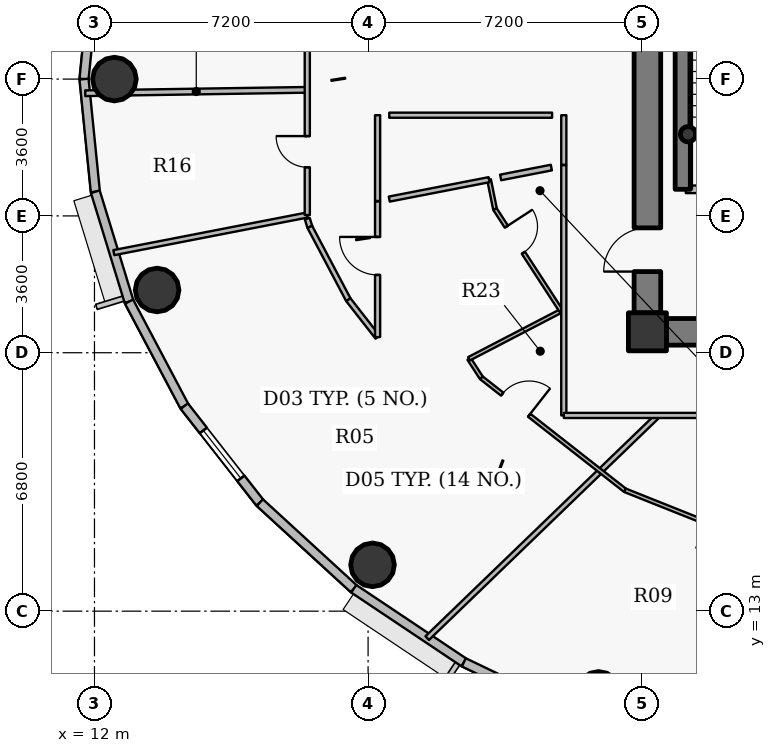
"""IFC4 building model, lengths in metres.
Left out: names, types, materials, properties, quantities, classifications, styles, units other than length and angle.
Written with IfcOpenShell. Run it as: python <this file> out.ifc"""

import sys

from ifc_helpers import new_model, si_unit, direction, frame, frame_2d, origin, origin_2d, place, context, subcontext, project, spatial, rectangle, hollow_circle, extrude, source, transform, mapped, element, fill, save


model = new_model("IFC4")
c1 = context("Model", 3, precision=1e-05, world=origin(), true_north=direction((0.0, 1.0)))
c2 = subcontext(c1, "Body", "Model", "MODEL_VIEW")
j1 = project(units=[si_unit("LENGTHUNIT", "METRE"), si_unit("PLANEANGLEUNIT", "RADIAN")], contexts=[c1])
p1 = place(None, origin())
s1 = spatial("IfcSite", under=j1, at=p1, CompositionType="ELEMENT")
p2 = place(p1, origin())
s2 = spatial("IfcBuilding", under=s1, at=p2, CompositionType="ELEMENT")
p3 = place(p2, frame((0.0, 0.0, 251.55)))
s3 = spatial("IfcBuildingStorey", under=s2, at=p3, CompositionType="ELEMENT", Elevation=251.55)
p4 = place(p3, frame((26.55, 20.35, 0.0), z_axis=(0.0, 0.0, 1.0), x_axis=(1.0, 0.0, 0.0)))
e1 = element("IfcColumn", 1, at=p4, inside=s3, PredefinedType="COLUMN", context=c2, shape_type="SweptSolid", body=[
    extrude(rectangle(XDim=1.0, YDim=1.0, at=origin_2d()), origin(), (0.0, 0.0, 1.0), 3.75),
])
p5 = place(p3, frame((27.48, 24.1, 0.0), z_axis=(0.0, 0.0, 1.0), x_axis=(0.0, 1.0, 0.0)))
e2 = element("IfcWall", 2, at=p5, inside=s3, PredefinedType="SHEAR", context=c2, shape_type="SweptSolid", body=[
    extrude(rectangle(XDim=8.6, YDim=0.4, at=frame_2d((4.3, 0.0))), origin(), (0.0, 0.0, 1.0), 3.75),
])
p6 = place(p3, frame((27.62, 25.55, 0.0), z_axis=(0.0, 0.0, 1.0), x_axis=(1.0, 0.0, 0.0)))
e3 = element("IfcColumn", 3, at=p6, inside=s3, PredefinedType="COLUMN", context=c2, shape_type="SweptSolid", body=[
    extrude(hollow_circle(Radius=0.203, WallThickness=0.016, at=origin_2d()), origin(), (0.0, 0.0, 1.0), 3.75),
])
p7 = place(p3, frame((44.95, 20.35, 0.0), z_axis=(0.0, 0.0, 1.0), x_axis=(-1.0, 0.0, 0.0)))
e4 = element("IfcWall", 4, at=p7, inside=s3, PredefinedType="SHEAR", context=c2, shape_type="SweptSolid", body=[
    extrude(rectangle(XDim=17.9, YDim=0.7, at=frame_2d((8.95, 0.0))), origin(), (0.0, 0.0, 1.0), 3.05),
])
p8 = place(p7, frame((9.7, 0.0, 0.0)))
e5 = element("IfcOpeningElement", 5, at=p8, cuts=e4, PredefinedType="OPENING", context=c2, shape_type="SweptSolid", body=[
    extrude(rectangle(XDim=1.15, YDim=2.15, at=origin_2d()), frame((0.575, 0.36, 1.075), z_axis=(0.0, -1.0, 0.0), x_axis=(1.0, 0.0, 0.0)), (0.0, 0.0, 1.0), 0.72),
])
p9 = place(p3, frame((26.55, 20.85, 0.0), z_axis=(0.0, 0.0, 1.0), x_axis=(0.0, 1.0, 0.0)))
e6 = element("IfcWall", 6, at=p9, inside=s3, PredefinedType="SHEAR", context=c2, shape_type="SweptSolid", body=[
    extrude(rectangle(XDim=12.3, YDim=0.7, at=frame_2d((6.15, 0.0))), origin(), (0.0, 0.0, 1.0), 3.05),
])
p10 = place(p9, frame((1.085, 0.0, 0.0)))
e7 = element("IfcOpeningElement", 7, at=p10, cuts=e6, PredefinedType="OPENING", context=c2, shape_type="SweptSolid", body=[
    extrude(rectangle(XDim=1.15, YDim=2.15, at=origin_2d()), frame((0.575, 0.36, 1.075), z_axis=(0.0, -1.0, 0.0), x_axis=(1.0, 0.0, 0.0)), (0.0, 0.0, 1.0), 0.72),
])
for number, where, z_axis, x_axis in (
    (8, (12.525, 27.0, 0.0), (0.0, 0.0, 1.0), (1.0, 0.0, 0.0)),
    (9, (13.649, 21.451, 0.0), (0.0, 0.0, 1.0), (1.0, 0.0, 0.0)),
    (10, (19.317, 14.219, 0.0), (0.0, 0.0, 1.0), (1.0, 0.0, 0.0)),
    (11, (25.265, 10.836, 0.0), (0.0, 0.0, 1.0), (1.0, 0.0, 0.0)),
):
    element("IfcColumn", number, at=place(p3, frame(where, z_axis=z_axis, x_axis=x_axis)), inside=s3, PredefinedType="COLUMN", context=c2, shape_type="SweptSolid", body=[
        extrude(hollow_circle(Radius=0.575, WallThickness=0.036, at=origin_2d()), origin(), (0.0, 0.0, 1.0), 3.75),
    ])
for number, where, z_axis, x_axis in (
    (12, (11.725, 27.0, 0.0), (0.0, 0.0, 1.0), (0.1, 0.995, 0.0)),
    (13, (12.023, 24.036, 0.0), (0.0, 0.0, 1.0), (-0.1, 0.995, 0.0)),
):
    element("IfcWall", number, at=place(p3, frame(where, z_axis=z_axis, x_axis=x_axis)), inside=s3, PredefinedType="SOLIDWALL", context=c2, shape_type="SweptSolid", body=[
        extrude(rectangle(XDim=2.979, YDim=0.24, at=frame_2d((1.489, 0.0))), origin(), (0.0, 0.0, 1.0), 3.5),
    ])
p11 = place(p3, frame((12.91, 21.144, 0.0), z_axis=(0.0, 0.0, 1.0), x_axis=(-0.293132907334, 0.95607170162, 0.0)))
e14 = element("IfcWall", 14, at=p11, inside=s3, PredefinedType="SOLIDWALL", context=c2, shape_type="SweptSolid", body=[
    extrude(rectangle(XDim=3.025, YDim=0.24, at=frame_2d((1.512, 0.0))), origin(), (0.0, 0.0, 1.0), 3.5),
])
p12 = place(p3, frame((14.364, 18.395, 0.0), z_axis=(0.0, 0.0, 1.0), x_axis=(-0.46766049993, 0.883908172157, 0.0)))
e15 = element("IfcWall", 15, at=p12, inside=s3, PredefinedType="SOLIDWALL", context=c2, shape_type="SweptSolid", body=[
    extrude(rectangle(XDim=3.11, YDim=0.24, at=frame_2d((1.555, 0.0))), origin(), (0.0, 0.0, 1.0), 3.5),
])
p13 = place(p3, frame((16.352, 15.855, 0.0), z_axis=(0.0, 0.0, 1.0), x_axis=(-0.616312344705, 0.787501805562, 0.0)))
e16 = element("IfcWall", 16, at=p13, inside=s3, PredefinedType="SOLIDWALL", context=c2, shape_type="SweptSolid", body=[
    extrude(rectangle(XDim=3.225, YDim=0.24, at=frame_2d((1.612, 0.0))), origin(), (0.0, 0.0, 1.0), 3.5),
])
p14 = place(p13, frame((0.812, 0.0, 0.9)))
e17 = element("IfcOpeningElement", 17, at=p14, cuts=e16, PredefinedType="OPENING", context=c2, shape_type="SweptSolid", body=[
    extrude(rectangle(XDim=1.6, YDim=1.75, at=origin_2d()), frame((0.8, 0.13, 0.875), z_axis=(0.0, -1.0, 0.0), x_axis=(1.0, 0.0, 0.0)), (0.0, 0.0, 1.0), 0.26),
])
p15 = place(p3, frame((18.824, 13.589, 0.0), z_axis=(0.0, 0.0, 1.0), x_axis=(-0.737123922599, 0.675757591694, 0.0)))
e18 = element("IfcWall", 18, at=p15, inside=s3, PredefinedType="SOLIDWALL", context=c2, shape_type="SweptSolid", body=[
    extrude(rectangle(XDim=3.354, YDim=0.24, at=frame_2d((1.677, 0.0))), origin(), (0.0, 0.0, 1.0), 3.5),
])
p16 = place(p3, frame((21.72, 11.652, 0.0), z_axis=(0.0, 0.0, 1.0), x_axis=(-0.831262496074, 0.555880079352, 0.0)))
e19 = element("IfcWall", 19, at=p16, inside=s3, PredefinedType="SOLIDWALL", context=c2, shape_type="SweptSolid", body=[
    extrude(rectangle(XDim=3.484, YDim=0.24, at=frame_2d((1.742, 0.0))), origin(), (0.0, 0.0, 1.0), 3.5),
])
p17 = place(p3, frame((24.969, 10.094, 0.0), z_axis=(0.0, 0.0, 1.0), x_axis=(-0.901598104751, 0.432574684313, 0.0)))
e20 = element("IfcWall", 20, at=p17, inside=s3, PredefinedType="SOLIDWALL", context=c2, shape_type="SweptSolid", body=[
    extrude(rectangle(XDim=3.604, YDim=0.24, at=frame_2d((1.802, 0.0))), origin(), (0.0, 0.0, 1.0), 3.5),
])
p18 = place(p3, frame((11.757, 26.628, 0.0), z_axis=(0.0, 0.0, 1.0), x_axis=(0.999882437841, 0.015333313333, 0.0)))
e21 = element("IfcWall", 21, at=p18, inside=s3, PredefinedType="PARTITIONING", context=c2, shape_type="SweptSolid", body=[
    extrude(rectangle(XDim=5.844, YDim=0.15, at=frame_2d((2.922, 0.0))), origin(), (0.0, 0.0, 1.0), 2.985),
])
p19 = place(p3, frame((12.509, 22.434, 0.0), z_axis=(0.0, 0.0, 1.0), x_axis=(0.981630821079, 0.190790280431, 0.0)))
e22 = element("IfcWall", 22, at=p19, inside=s3, PredefinedType="PARTITIONING", context=c2, shape_type="SweptSolid", body=[
    extrude(rectangle(XDim=5.186, YDim=0.135, at=frame_2d((2.593, 0.0))), origin(), (0.0, 0.0, 1.0), 2.985),
])
p20 = place(p3, frame((17.6, 23.328, 0.0), z_axis=(0.0, 0.0, 1.0), x_axis=(0.292875000845, -0.956150738053, 0.0)))
e23 = element("IfcWall", 23, at=p20, inside=s3, PredefinedType="PARTITIONING", context=c2, shape_type="SweptSolid", body=[
    extrude(rectangle(XDim=0.227, YDim=0.135, at=frame_2d((0.113, 0.0))), origin(), (0.0, 0.0, 1.0), 3.5),
])
p21 = place(p3, frame((17.6, 23.423, 0.0), z_axis=(0.0, 0.0, 1.0), x_axis=(0.0, 1.0, 0.0)))
e24 = element("IfcWall", 24, at=p21, inside=s3, PredefinedType="PARTITIONING", context=c2, shape_type="SweptSolid", body=[
    extrude(rectangle(XDim=4.527, YDim=0.135, at=frame_2d((2.263, 0.0))), origin(), (0.0, 0.0, 1.0), 2.935),
])
p22 = place(p21, frame((1.257, 0.0, 0.0)))
e25 = element("IfcOpeningElement", 25, at=p22, cuts=e24, PredefinedType="OPENING", context=c2, shape_type="SweptSolid", body=[
    extrude(rectangle(XDim=0.82, YDim=2.1, at=origin_2d()), frame((0.41, 0.078, 1.05), z_axis=(0.0, -1.0, 0.0), x_axis=(1.0, 0.0, 0.0)), (0.0, 0.0, 1.0), 0.155),
])
p23 = place(p3, frame((17.667, 23.111, 0.0), z_axis=(0.0, 0.0, 1.0), x_axis=(0.467675622269, -0.883900171024, 0.0)))
e26 = element("IfcWall", 26, at=p23, inside=s3, PredefinedType="PARTITIONING", context=c2, shape_type="SweptSolid", body=[
    extrude(rectangle(XDim=2.168, YDim=0.135, at=frame_2d((1.084, 0.0))), origin(), (0.0, 0.0, 1.0), 2.935),
])
p24 = place(p3, frame((18.681, 21.194, 0.0), z_axis=(0.0, 0.0, 1.0), x_axis=(0.616239706802, -0.787558647823, 0.0)))
e27 = element("IfcWall", 27, at=p24, inside=s3, PredefinedType="PARTITIONING", context=c2, shape_type="SweptSolid", body=[
    extrude(rectangle(XDim=1.248, YDim=0.135, at=frame_2d((0.624, 0.0))), origin(), (0.0, 0.0, 1.0), 3.5),
])
p25 = place(p3, frame((19.45, 20.211, 0.0), z_axis=(0.0, 0.0, 1.0), x_axis=(0.0, 1.0, 0.0)))
e28 = element("IfcWall", 28, at=p25, inside=s3, PredefinedType="PARTITIONING", context=c2, shape_type="SweptSolid", body=[
    extrude(rectangle(XDim=3.572, YDim=0.135, at=frame_2d((1.786, 0.0))), origin(), (0.0, 0.0, 1.0), 2.935),
])
p26 = place(p25, frame((1.636, 0.0, 0.0)))
e29 = element("IfcOpeningElement", 29, at=p26, cuts=e28, PredefinedType="OPENING", context=c2, shape_type="SweptSolid", body=[
    extrude(rectangle(XDim=1.0, YDim=2.15, at=origin_2d()), frame((0.5, 0.078, 1.075), z_axis=(0.0, -1.0, 0.0), x_axis=(1.0, 0.0, 0.0)), (0.0, 0.0, 1.0), 0.155),
])
p27 = place(p3, frame((20.756, 12.291, 0.0), z_axis=(0.0, 0.0, 1.0), x_axis=(0.719623273788, 0.694364705196, 0.0)))
e30 = element("IfcWall", 30, at=p27, inside=s3, PredefinedType="PARTITIONING", context=c2, shape_type="SweptSolid", body=[
    extrude(rectangle(XDim=8.438, YDim=0.135, at=frame_2d((4.219, 0.0))), origin(), (0.0, 0.0, 1.0), 2.985),
])
p28 = place(p3, frame((21.856, 19.641, 0.0), z_axis=(0.0, 0.0, 1.0), x_axis=(0.545246536912, -0.838275738636, 0.0)))
e31 = element("IfcWall", 31, at=p28, inside=s3, PredefinedType="PARTITIONING", context=c2, shape_type="SweptSolid", body=[
    extrude(rectangle(XDim=0.598, YDim=0.1, at=frame_2d((0.299, 0.0))), origin(), (0.0, 0.0, 1.0), 3.5),
])
p29 = place(p3, frame((21.856, 19.641, 0.0), z_axis=(0.0, 0.0, 1.0), x_axis=(0.887130502634, 0.461518657582, 0.0)))
e32 = element("IfcWall", 32, at=p29, inside=s3, PredefinedType="PARTITIONING", context=c2, shape_type="SweptSolid", body=[
    extrude(rectangle(XDim=2.733, YDim=0.1, at=frame_2d((1.367, 0.0))), origin(), (0.0, 0.0, 1.0), 3.5),
])
p30 = place(p3, frame((22.182, 19.139, 0.0), z_axis=(0.0, 0.0, 1.0), x_axis=(0.787386902975, -0.616459134917, 0.0)))
e33 = element("IfcWall", 33, at=p30, inside=s3, PredefinedType="PARTITIONING", context=c2, shape_type="SweptSolid", body=[
    extrude(rectangle(XDim=4.799, YDim=0.1, at=frame_2d((2.399, 0.0))), origin(), (0.0, 0.0, 1.0), 2.935),
])
p31 = place(p30, frame((0.695, 0.0, 0.0)))
e34 = element("IfcOpeningElement", 34, at=p31, cuts=e33, PredefinedType="OPENING", context=c2, shape_type="SweptSolid", body=[
    extrude(rectangle(XDim=0.9, YDim=2.1, at=origin_2d()), frame((0.45, 0.06, 1.05), z_axis=(0.0, -1.0, 0.0), x_axis=(1.0, 0.0, 0.0)), (0.0, 0.0, 1.0), 0.12),
])
p32 = place(p3, frame((22.383, 24.353, 0.0), z_axis=(0.0, 0.0, 1.0), x_axis=(0.198542560358, -0.980092266946, 0.0)))
e35 = element("IfcWall", 35, at=p32, inside=s3, PredefinedType="PARTITIONING", context=c2, shape_type="SweptSolid", body=[
    extrude(rectangle(XDim=0.793, YDim=0.1, at=frame_2d((0.396, 0.0))), origin(), (0.0, 0.0, 1.0), 2.935),
])
p33 = place(p3, frame((22.541, 23.576, 0.0), z_axis=(0.0, 0.0, 1.0), x_axis=(0.545375666154, -0.838191733893, 0.0)))
e36 = element("IfcWall", 36, at=p33, inside=s3, PredefinedType="PARTITIONING", context=c2, shape_type="SweptSolid", body=[
    extrude(rectangle(XDim=3.19, YDim=0.1, at=frame_2d((1.595, 0.0))), origin(), (0.0, 0.0, 1.0), 2.935),
])
p34 = place(p33, frame((0.546, 0.0, 0.0)))
e37 = element("IfcOpeningElement", 37, at=p34, cuts=e36, PredefinedType="OPENING", context=c2, shape_type="SweptSolid", body=[
    extrude(rectangle(XDim=0.82, YDim=2.1, at=origin_2d()), frame((0.41, 0.06, 1.05), z_axis=(0.0, -1.0, 0.0), x_axis=(1.0, 0.0, 0.0)), (0.0, 0.0, 1.0), 0.12),
])
p35 = place(p3, frame((24.35, 18.15, 0.0), z_axis=(0.0, 0.0, 1.0), x_axis=(0.0, 1.0, 0.0)))
e38 = element("IfcWall", 38, at=p35, inside=s3, PredefinedType="PARTITIONING", context=c2, shape_type="SweptSolid", body=[
    extrude(rectangle(XDim=6.585, YDim=0.135, at=frame_2d((3.293, 0.0))), origin(), (0.0, 0.0, 1.0), 2.935),
])
p36 = place(p3, frame((24.35, 18.15, 0.0), z_axis=(0.0, 0.0, 1.0), x_axis=(1.0, 0.0, 0.0)))
e39 = element("IfcWall", 39, at=p36, inside=s3, PredefinedType="PARTITIONING", context=c2, shape_type="SweptSolid", body=[
    extrude(rectangle(XDim=23.85, YDim=0.135, at=frame_2d((11.925, 0.0))), origin(), (0.0, 0.0, 1.0), 2.935),
])
p37 = place(p36, frame((6.069, 0.0, 0.0)))
e40 = element("IfcOpeningElement", 40, at=p37, cuts=e39, PredefinedType="OPENING", context=c2, shape_type="SweptSolid", body=[
    extrude(rectangle(XDim=1.0, YDim=2.15, at=origin_2d()), frame((0.5, 0.078, 1.075), z_axis=(0.0, -1.0, 0.0), x_axis=(1.0, 0.0, 0.0)), (0.0, 0.0, 1.0), 0.155),
])
p38 = place(p36, frame((19.505, 0.0, 0.0)))
e41 = element("IfcOpeningElement", 41, at=p38, cuts=e39, PredefinedType="OPENING", context=c2, shape_type="SweptSolid", body=[
    extrude(rectangle(XDim=1.0, YDim=2.15, at=origin_2d()), frame((0.5, 0.078, 1.075), z_axis=(0.0, -1.0, 0.0), x_axis=(1.0, 0.0, 0.0)), (0.0, 0.0, 1.0), 0.155),
])
p39 = place(p3, frame((25.961, 16.181, 0.0), z_axis=(0.0, 0.0, 1.0), x_axis=(0.928801505367, -0.370577608105, 0.0)))
e42 = element("IfcWall", 42, at=p39, inside=s3, PredefinedType="PARTITIONING", context=c2, shape_type="SweptSolid", body=[
    extrude(rectangle(XDim=5.126, YDim=0.1, at=frame_2d((2.563, 0.0))), origin(), (0.0, 0.0, 1.0), 2.935),
])
p40 = place(p3, frame((27.56, 24.1, 0.0), z_axis=(0.0, 0.0, 1.0), x_axis=(1.0, 0.0, 0.0)))
e43 = element("IfcWall", 43, at=p40, inside=s3, PredefinedType="PARTITIONING", context=c2, shape_type="SweptSolid", body=[
    extrude(rectangle(XDim=3.54, YDim=0.2, at=frame_2d((1.77, 0.0))), origin(), (0.0, 0.0, 1.0), 3.5),
])
p41 = place(p40, frame((1.17, 0.0, 0.0)))
e44 = element("IfcOpeningElement", 44, at=p41, cuts=e43, PredefinedType="OPENING", context=c2, shape_type="SweptSolid", body=[
    extrude(rectangle(XDim=1.2, YDim=2.15, at=origin_2d()), frame((0.6, 0.11, 1.075), z_axis=(0.0, -1.0, 0.0), x_axis=(1.0, 0.0, 0.0)), (0.0, 0.0, 1.0), 0.22),
])
p42 = place(p3, frame((19.45, 26.05, 0.0), z_axis=(0.0, 0.0, 1.0), x_axis=(0.0, -1.0, 0.0)))
e45 = element("IfcWall", 45, at=p42, inside=s3, PredefinedType="PARTITIONING", context=c2, shape_type="SweptSolid", body=[
    extrude(rectangle(XDim=2.257, YDim=0.135, at=frame_2d((1.128, 0.0))), origin(), (0.0, 0.0, 1.0), 3.5),
])
p43 = place(p3, frame((26.2, 20.84, 0.0), z_axis=(0.0, 0.0, 1.0), x_axis=(0.0, -1.0, 0.0)))
e46 = element("IfcWall", 46, at=p43, inside=s3, PredefinedType="PARTITIONING", context=c2, shape_type="SweptSolid", body=[
    extrude(rectangle(XDim=0.84, YDim=0.135, at=frame_2d((0.42, 0.0))), origin(), (0.0, 0.0, 1.0), 3.185),
])
p44 = place(p3, frame((26.508, 20.0, 0.0), z_axis=(0.0, 0.0, 1.0), x_axis=(1.0, 0.0, 0.0)))
e47 = element("IfcWall", 47, at=p44, inside=s3, PredefinedType="PARTITIONING", context=c2, shape_type="SweptSolid", body=[
    extrude(rectangle(XDim=0.532, YDim=0.135, at=frame_2d((0.266, 0.0))), origin(), (0.0, 0.0, 1.0), 2.935),
])
p45 = place(p3, frame((24.35, 24.745, 0.0), z_axis=(0.0, 0.0, 1.0), x_axis=(0.0, 1.0, 0.0)))
e48 = element("IfcWall", 48, at=p45, inside=s3, PredefinedType="PARTITIONING", context=c2, shape_type="SweptSolid", body=[
    extrude(rectangle(XDim=1.305, YDim=0.135, at=frame_2d((0.652, 0.0))), origin(), (0.0, 0.0, 1.0), 3.5),
])
p46 = place(p3, frame((24.042, 26.05, 0.0), z_axis=(0.0, 0.0, 1.0), x_axis=(-1.0, 0.0, 0.0)))
e49 = element("IfcWall", 49, at=p46, inside=s3, PredefinedType="PARTITIONING", context=c2, shape_type="SweptSolid", body=[
    extrude(rectangle(XDim=4.285, YDim=0.135, at=frame_2d((2.143, 0.0))), origin(), (0.0, 0.0, 1.0), 3.5),
])
p47 = place(p3, frame((22.688, 24.412, 0.0), z_axis=(0.0, 0.0, 1.0), x_axis=(0.981616324133, 0.19086485322, 0.0)))
e50 = element("IfcWall", 50, at=p47, inside=s3, PredefinedType="PARTITIONING", context=c2, shape_type="SweptSolid", body=[
    extrude(rectangle(XDim=1.36, YDim=0.15, at=frame_2d((0.68, 0.0))), origin(), (0.0, 0.0, 1.0), 3.5),
])
p48 = place(p3, frame((19.758, 23.843, 0.0), z_axis=(0.0, 0.0, 1.0), x_axis=(0.98161966457, 0.190847672582, 0.0)))
e51 = element("IfcWall", 51, at=p48, inside=s3, PredefinedType="PARTITIONING", context=c2, shape_type="SweptSolid", body=[
    extrude(rectangle(XDim=2.675, YDim=0.135, at=frame_2d((1.337, 0.0))), origin(), (0.0, 0.0, 1.0), 3.5),
])
m1 = source(origin(), c2, "Body", "SweptSolid", [
    extrude(rectangle(XDim=1.6, YDim=1.75, at=origin_2d()), frame((0.8, 0.03, 0.875), z_axis=(0.0, -1.0, 0.0), x_axis=(1.0, 0.0, 0.0)), (0.0, 0.0, 1.0), 0.06),
])
p49 = place(p14, origin())
e52 = element("IfcWindow", 52, at=p49, inside=s3, PartitioningType="DOUBLE_PANEL_VERTICAL", PredefinedType="WINDOW", context=c2, shape_type="MappedRepresentation", body=[
    mapped(m1, transform((0.0, 0.0, 0.0), x_axis=(1.0, 0.0, 0.0), y_axis=(0.0, 1.0, 0.0), z_axis=(0.0, 0.0, 1.0), scale=1.0)),
])
fill(e17, e52)
m2 = source(origin(), c2, "Body", "SweptSolid", [
    extrude(rectangle(XDim=1.15, YDim=2.15, at=origin_2d()), frame((0.575, 0.025, 1.075), z_axis=(0.0, -1.0, 0.0), x_axis=(1.0, 0.0, 0.0)), (0.0, 0.0, 1.0), 0.05),
])
p50 = place(p10, origin())
e53 = element("IfcDoor", 53, at=p50, inside=s3, OperationType="SINGLE_SWING_LEFT", PredefinedType="DOOR", context=c2, shape_type="MappedRepresentation", body=[
    mapped(m2, transform((0.0, 0.0, 0.0), x_axis=(1.0, 0.0, 0.0), y_axis=(0.0, 1.0, 0.0), z_axis=(0.0, 0.0, 1.0), scale=1.0)),
])
fill(e7, e53)
m3 = source(origin(), c2, "Body", "SweptSolid", [
    extrude(rectangle(XDim=1.0, YDim=2.15, at=origin_2d()), frame((0.5, 0.025, 1.075), z_axis=(0.0, -1.0, 0.0), x_axis=(1.0, 0.0, 0.0)), (0.0, 0.0, 1.0), 0.05),
])
p51 = place(p26, origin())
e54 = element("IfcDoor", 54, at=p51, inside=s3, OperationType="SINGLE_SWING_RIGHT", PredefinedType="DOOR", context=c2, shape_type="MappedRepresentation", body=[
    mapped(m3, transform((0.0, 0.0, 0.0), x_axis=(1.0, 0.0, 0.0), y_axis=(0.0, 1.0, 0.0), z_axis=(0.0, 0.0, 1.0), scale=1.0)),
])
fill(e29, e54)
m4 = source(origin(), c2, "Body", "SweptSolid", [
    extrude(rectangle(XDim=0.82, YDim=2.1, at=origin_2d()), frame((0.41, 0.025, 1.05), z_axis=(0.0, -1.0, 0.0), x_axis=(1.0, 0.0, 0.0)), (0.0, 0.0, 1.0), 0.05),
])
p52 = place(p34, origin())
e55 = element("IfcDoor", 55, at=p52, inside=s3, OperationType="SINGLE_SWING_LEFT", PredefinedType="DOOR", context=c2, shape_type="MappedRepresentation", body=[
    mapped(m4, transform((0.0, 0.0, 0.0), x_axis=(1.0, 0.0, 0.0), y_axis=(0.0, 1.0, 0.0), z_axis=(0.0, 0.0, 1.0), scale=1.0)),
])
fill(e37, e55)
m5 = source(origin(), c2, "Body", "SweptSolid", [
    extrude(rectangle(XDim=0.9, YDim=2.1, at=origin_2d()), frame((0.45, 0.025, 1.05), z_axis=(0.0, -1.0, 0.0), x_axis=(1.0, 0.0, 0.0)), (0.0, 0.0, 1.0), 0.05),
])
p53 = place(p31, origin())
e56 = element("IfcDoor", 56, at=p53, inside=s3, OperationType="SINGLE_SWING_RIGHT", PredefinedType="DOOR", context=c2, shape_type="MappedRepresentation", body=[
    mapped(m5, transform((0.0, 0.0, 0.0), x_axis=(1.0, 0.0, 0.0), y_axis=(0.0, 1.0, 0.0), z_axis=(0.0, 0.0, 1.0), scale=1.0)),
])
fill(e34, e56)
p54 = place(p22, origin())
e57 = element("IfcDoor", 57, at=p54, inside=s3, OperationType="SINGLE_SWING_RIGHT", PredefinedType="DOOR", context=c2, shape_type="MappedRepresentation", body=[
    mapped(m4, transform((0.0, 0.0, 0.0), x_axis=(1.0, 0.0, 0.0), y_axis=(0.0, 1.0, 0.0), z_axis=(0.0, 0.0, 1.0), scale=1.0)),
])
fill(e25, e57)
save(model, sys.argv[1])
